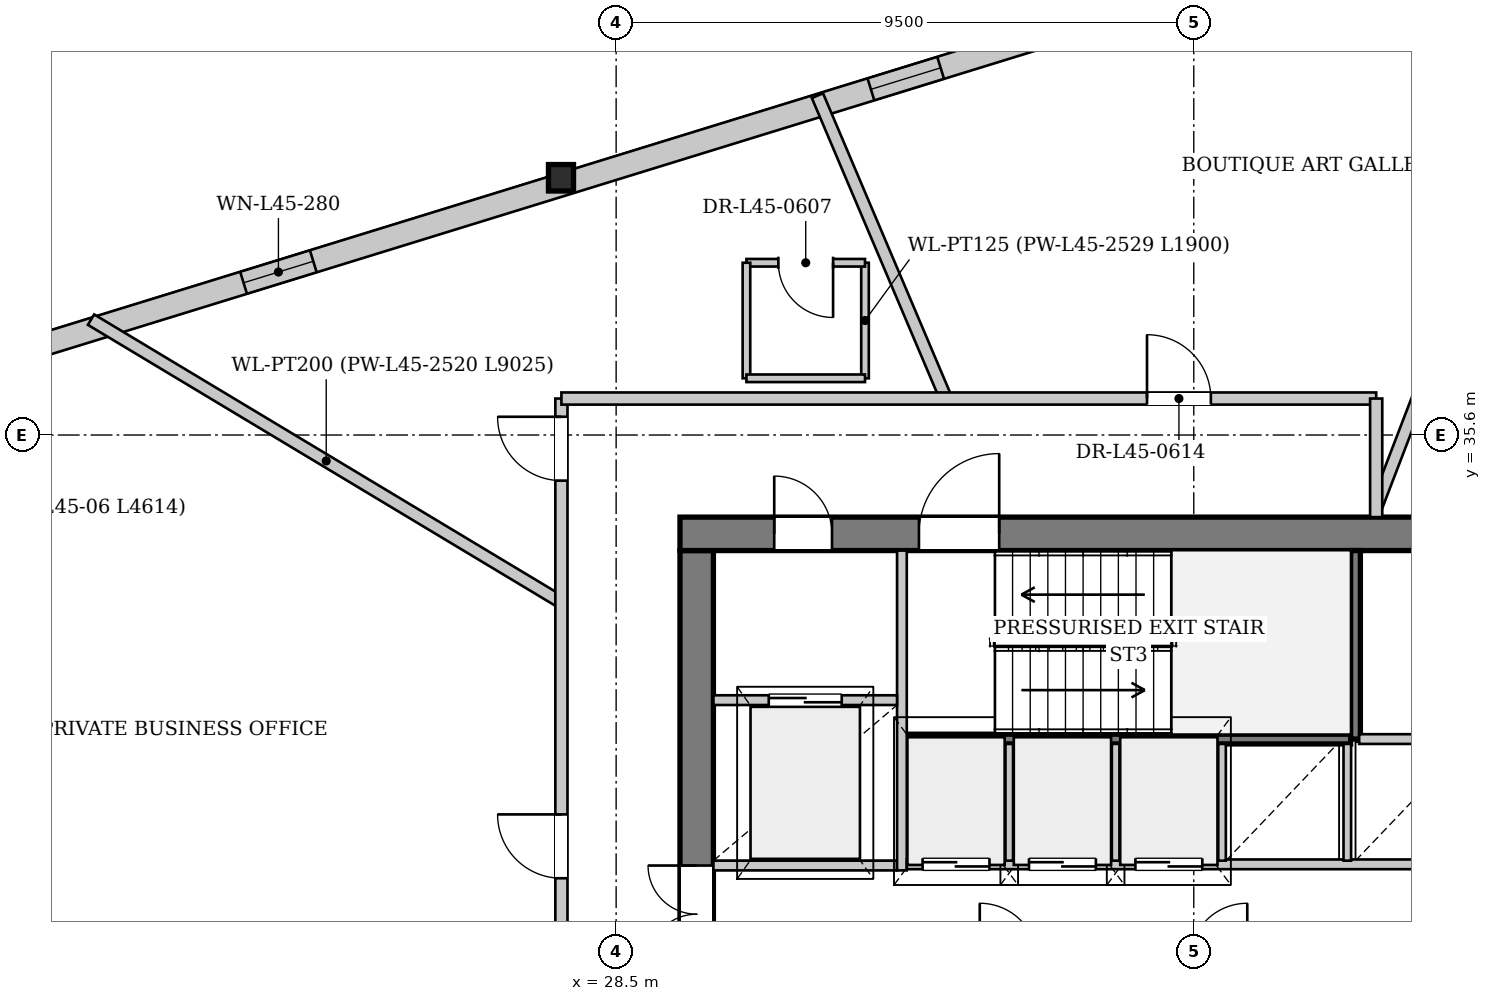
"""IFC4 building model, lengths in metres.
Left out: names, types, materials, properties, quantities, classifications, styles, units other than length and angle.
Written with IfcOpenShell. Run it as: python <this file> out.ifc"""

import sys

from ifc_helpers import new_model, si_unit, direction, frame, frame_2d, origin, origin_2d, place, context, subcontext, project, spatial, rectangle, i_section, extrude, source, transform, mapped, element, fill, save


model = new_model("IFC4")
c1 = context("Model", 3, precision=1e-05, world=origin(), true_north=direction((0.0, 1.0)))
c2 = subcontext(c1, "Body", "Model", "MODEL_VIEW")
j1 = project(units=[si_unit("LENGTHUNIT", "METRE"), si_unit("PLANEANGLEUNIT", "RADIAN")], contexts=[c1])
p1 = place(None, origin())
s1 = spatial("IfcSite", under=j1, at=p1, CompositionType="ELEMENT")
p2 = place(p1, origin())
s2 = spatial("IfcBuilding", under=s1, at=p2, CompositionType="ELEMENT")
p3 = place(p2, frame((0.0, 0.0, 171.45)))
s3 = spatial("IfcBuildingStorey", under=s2, at=p3, CompositionType="ELEMENT", Elevation=171.45)
m1 = source(origin(), c2, "Body", "SweptSolid", [
    extrude(i_section(OverallWidth=0.412, OverallDepth=0.435, WebThickness=0.031, FlangeThickness=0.05, at=origin_2d()), origin(), (0.0, 0.0, 1.0), 3.398),
])
p4 = place(p3, frame((27.69, 39.942, 0.0), z_axis=(-0.057121293982, -0.065599674724, 0.996209737179), x_axis=(0.754160771495, -0.65668982841, 0.0)))
e1 = element("IfcColumn", 1, at=p4, inside=s3, PredefinedType="COLUMN", context=c2, shape_type="MappedRepresentation", body=[
    mapped(m1, transform((0.0, 0.0, 0.0), x_axis=(1.0, 0.0, 0.0), y_axis=(0.0, 1.0, 0.0), z_axis=(0.0, 0.0, 1.0), scale=1.0)),
])
p5 = place(p3, frame((21.913, 15.928, 0.0), z_axis=(0.0, 0.0, 1.0), x_axis=(-0.384327280835, 0.92319691356, 0.0)))
e2 = element("IfcWall", 2, at=p5, inside=s3, PredefinedType="SOLIDWALL", context=c2, shape_type="SweptSolid", body=[
    extrude(rectangle(XDim=17.872, YDim=0.32, at=frame_2d((8.936, 0.0))), origin(), (0.0, 0.0, 1.0), 2.722),
])
p6 = place(p5, frame((4.969, 0.0, 0.0)))
e3 = element("IfcOpeningElement", 3, at=p6, cuts=e2, PredefinedType="OPENING", context=c2, shape_type="SweptSolid", body=[
    extrude(rectangle(XDim=1.5, YDim=2.3, at=frame_2d((0.75, 1.15))), frame((0.0, 0.17, 0.0), z_axis=(0.0, -1.0, 0.0), x_axis=(1.0, 0.0, 0.0)), (0.0, 0.0, 1.0), 0.34),
])
p7 = place(p5, frame((11.925, 0.0, 0.252)))
e4 = element("IfcOpeningElement", 4, at=p7, cuts=e2, PredefinedType="OPENING", context=c2, shape_type="SweptSolid", body=[
    extrude(rectangle(XDim=2.6, YDim=2.35, at=frame_2d((1.3, 1.175))), frame((0.0, 0.17, 0.0), z_axis=(0.0, -1.0, 0.0), x_axis=(1.0, 0.0, 0.0)), (0.0, 0.0, 1.0), 0.34),
])
p8 = place(p3, frame((16.837, 36.396, 0.0), z_axis=(0.0, 0.0, 1.0), x_axis=(0.955604756782, 0.294651571887, 0.0)))
e5 = element("IfcWall", 5, at=p8, inside=s3, PredefinedType="SOLIDWALL", context=c2, shape_type="SweptSolid", body=[
    extrude(rectangle(XDim=22.833, YDim=0.38, at=frame_2d((11.417, 0.0))), origin(), (0.0, 0.0, 1.0), 2.722),
])
p9 = place(p8, frame((5.793, 0.0, 0.65)))
e6 = element("IfcOpeningElement", 6, at=p9, cuts=e5, PredefinedType="OPENING", context=c2, shape_type="SweptSolid", body=[
    extrude(rectangle(XDim=1.2, YDim=1.5, at=frame_2d((0.6, 0.75))), frame((0.0, 0.2, 0.0), z_axis=(0.0, -1.0, 0.0), x_axis=(1.0, 0.0, 0.0)), (0.0, 0.0, 1.0), 0.4),
])
p10 = place(p8, frame((16.59, 0.0, 0.65)))
e7 = element("IfcOpeningElement", 7, at=p10, cuts=e5, PredefinedType="OPENING", context=c2, shape_type="SweptSolid", body=[
    extrude(rectangle(XDim=1.2, YDim=1.5, at=frame_2d((0.6, 0.75))), frame((0.0, 0.2, 0.0), z_axis=(0.0, -1.0, 0.0), x_axis=(1.0, 0.0, 0.0)), (0.0, 0.0, 1.0), 0.4),
])
p11 = place(p3, frame((29.825, 19.5, 0.0), z_axis=(0.0, 0.0, 1.0), x_axis=(0.0, 1.0, 0.0)))
e8 = element("IfcWall", 8, at=p11, inside=s3, PredefinedType="SHEAR", context=c2, shape_type="SweptSolid", body=[
    extrude(rectangle(XDim=14.2, YDim=0.55, at=frame_2d((7.1, 0.0))), origin(), (0.0, 0.0, 1.0), 3.33),
])
p12 = place(p11, frame((7.42, 0.0, 0.0)))
e9 = element("IfcOpeningElement", 9, at=p12, cuts=e8, PredefinedType="OPENING", context=c2, shape_type="SweptSolid", body=[
    extrude(rectangle(XDim=1.6, YDim=2.2, at=frame_2d((0.8, 1.1))), frame((0.0, 0.285, 0.0), z_axis=(0.0, -1.0, 0.0), x_axis=(1.0, 0.0, 0.0)), (0.0, 0.0, 1.0), 0.57),
])
p13 = place(p3, frame((29.55, 33.975, 0.0), z_axis=(0.0, 0.0, 1.0), x_axis=(1.0, 0.0, 0.0)))
e10 = element("IfcWall", 10, at=p13, inside=s3, PredefinedType="SHEAR", context=c2, shape_type="SweptSolid", body=[
    extrude(rectangle(XDim=16.9, YDim=0.55, at=frame_2d((8.45, 0.0))), origin(), (0.0, 0.0, 1.0), 3.33),
])
p14 = place(p13, frame((1.55, 0.0, 0.0)))
e11 = element("IfcOpeningElement", 11, at=p14, cuts=e10, PredefinedType="OPENING", context=c2, shape_type="SweptSolid", body=[
    extrude(rectangle(XDim=0.95, YDim=2.1, at=frame_2d((0.475, 1.05))), frame((0.0, 0.285, 0.0), z_axis=(0.0, -1.0, 0.0), x_axis=(1.0, 0.0, 0.0)), (0.0, 0.0, 1.0), 0.57),
])
p15 = place(p13, frame((3.93, 0.0, 0.0)))
e12 = element("IfcOpeningElement", 12, at=p15, cuts=e10, PredefinedType="OPENING", context=c2, shape_type="SweptSolid", body=[
    extrude(rectangle(XDim=1.32, YDim=2.2, at=frame_2d((0.66, 1.1))), frame((0.0, 0.285, 0.0), z_axis=(0.0, -1.0, 0.0), x_axis=(1.0, 0.0, 0.0)), (0.0, 0.0, 1.0), 0.57),
])
p16 = place(p3, frame((33.28, 30.6, 0.0), z_axis=(0.0, 0.0, 1.0), x_axis=(1.0, 0.0, 0.0)))
e13 = element("IfcWall", 13, at=p16, inside=s3, PredefinedType="PARTITIONING", context=c2, shape_type="SweptSolid", body=[
    extrude(rectangle(XDim=7.3, YDim=0.16, at=frame_2d((3.65, 0.0))), origin(), (0.0, 0.0, 1.0), 3.33),
])
p17 = place(p3, frame((40.66, 30.6, 0.0), z_axis=(0.0, 0.0, 1.0), x_axis=(0.0, 1.0, 0.0)))
e14 = element("IfcWall", 14, at=p17, inside=s3, PredefinedType="PARTITIONING", context=c2, shape_type="SweptSolid", body=[
    extrude(rectangle(XDim=3.1, YDim=0.16, at=frame_2d((1.55, 0.0))), origin(), (0.0, 0.0, 1.0), 3.33),
])
p18 = place(p3, frame((30.1, 28.52, 0.0), z_axis=(0.0, 0.0, 1.0), x_axis=(1.0, 0.0, 0.0)))
e15 = element("IfcWall", 15, at=p18, inside=s3, PredefinedType="PARTITIONING", context=c2, shape_type="SweptSolid", body=[
    extrude(rectangle(XDim=3.02, YDim=0.16, at=frame_2d((1.51, 0.0))), origin(), (0.0, 0.0, 1.0), 3.33),
])
p19 = place(p3, frame((33.2, 28.44, 0.0), z_axis=(0.0, 0.0, 1.0), x_axis=(0.0, 1.0, 0.0)))
e16 = element("IfcWall", 16, at=p19, inside=s3, PredefinedType="PARTITIONING", context=c2, shape_type="SweptSolid", body=[
    extrude(rectangle(XDim=5.26, YDim=0.16, at=frame_2d((2.63, 0.0))), origin(), (0.0, 0.0, 1.0), 3.33),
])
p20 = place(p3, frame((30.1, 31.24, 0.0), z_axis=(0.0, 0.0, 1.0), x_axis=(1.0, 0.0, 0.0)))
e17 = element("IfcWall", 17, at=p20, inside=s3, PredefinedType="PARTITIONING", context=c2, shape_type="SweptSolid", body=[
    extrude(rectangle(XDim=3.02, YDim=0.16, at=frame_2d((1.51, 0.0))), origin(), (0.0, 0.0, 1.0), 3.33),
])
p21 = place(p20, frame((0.91, 0.0, 0.0)))
e18 = element("IfcOpeningElement", 18, at=p21, cuts=e17, PredefinedType="OPENING", context=c2, shape_type="SweptSolid", body=[
    extrude(rectangle(XDim=1.2, YDim=2.2, at=frame_2d((0.6, 1.1))), frame((0.0, 0.09, 0.0), z_axis=(0.0, -1.0, 0.0), x_axis=(1.0, 0.0, 0.0)), (0.0, 0.0, 1.0), 0.18),
])
p22 = place(p3, frame((33.28, 28.54, 0.0), z_axis=(0.0, 0.0, 1.0), x_axis=(1.0, 0.0, 0.0)))
e19 = element("IfcWall", 19, at=p22, inside=s3, PredefinedType="PARTITIONING", context=c2, shape_type="SweptSolid", body=[
    extrude(rectangle(XDim=12.62, YDim=0.16, at=frame_2d((6.31, 0.0))), origin(), (0.0, 0.0, 1.0), 3.33),
])
p23 = place(p22, frame((0.26, 0.0, 0.0)))
e20 = element("IfcOpeningElement", 20, at=p23, cuts=e19, PredefinedType="OPENING", context=c2, shape_type="SweptSolid", body=[
    extrude(rectangle(XDim=1.1, YDim=2.2, at=frame_2d((0.55, 1.1))), frame((0.0, 0.09, 0.0), z_axis=(0.0, -1.0, 0.0), x_axis=(1.0, 0.0, 0.0)), (0.0, 0.0, 1.0), 0.18),
])
p24 = place(p22, frame((2.01, 0.0, 0.0)))
e21 = element("IfcOpeningElement", 21, at=p24, cuts=e19, PredefinedType="OPENING", context=c2, shape_type="SweptSolid", body=[
    extrude(rectangle(XDim=1.1, YDim=2.2, at=frame_2d((0.55, 1.1))), frame((0.0, 0.09, 0.0), z_axis=(0.0, -1.0, 0.0), x_axis=(1.0, 0.0, 0.0)), (0.0, 0.0, 1.0), 0.18),
])
p25 = place(p22, frame((3.76, 0.0, 0.0)))
e22 = element("IfcOpeningElement", 22, at=p25, cuts=e19, PredefinedType="OPENING", context=c2, shape_type="SweptSolid", body=[
    extrude(rectangle(XDim=1.1, YDim=2.2, at=frame_2d((0.55, 1.1))), frame((0.0, 0.09, 0.0), z_axis=(0.0, -1.0, 0.0), x_axis=(1.0, 0.0, 0.0)), (0.0, 0.0, 1.0), 0.18),
])
p26 = place(p3, frame((40.72, 30.6, 0.0), z_axis=(0.0, 0.0, 1.0), x_axis=(1.0, 0.0, 0.0)))
e23 = element("IfcWall", 23, at=p26, inside=s3, PredefinedType="PARTITIONING", context=c2, shape_type="SweptSolid", body=[
    extrude(rectangle(XDim=5.18, YDim=0.16, at=frame_2d((2.59, 0.0))), origin(), (0.0, 0.0, 1.0), 3.33),
])
for number, where, z_axis, x_axis in (
    (24, (34.965, 28.6, 0.0), (0.0, 0.0, 1.0), (0.0, 1.0, 0.0)),
    (25, (36.715, 28.6, 0.0), (0.0, 0.0, 1.0), (0.0, 1.0, 0.0)),
    (26, (38.465, 28.6, 0.0), (0.0, 0.0, 1.0), (0.0, 1.0, 0.0)),
    (27, (40.525, 28.6, 0.0), (0.0, 0.0, 1.0), (0.0, 1.0, 0.0)),
):
    element("IfcWall", number, at=place(p3, frame(where, z_axis=z_axis, x_axis=x_axis)), inside=s3, PredefinedType="PARTITIONING", context=c2, shape_type="SweptSolid", body=[
        extrude(rectangle(XDim=1.92, YDim=0.125, at=frame_2d((0.96, 0.0))), origin(), (0.0, 0.0, 1.0), 3.33),
    ])
p27 = place(p3, frame((27.6, 32.849, 0.0), z_axis=(0.0, 0.0, 1.0), x_axis=(-0.857180094002, 0.515016782684, 0.0)))
e28 = element("IfcWall", 28, at=p27, inside=s3, PredefinedType="PARTITIONING", context=c2, shape_type="SweptSolid", body=[
    extrude(rectangle(XDim=9.025, YDim=0.2, at=frame_2d((4.513, 0.0))), origin(), (0.0, 0.0, 1.0), 3.33),
])
p28 = place(p3, frame((41.0, 34.415, 0.0), z_axis=(0.0, 0.0, 1.0), x_axis=(0.358366692875, 0.933580908887, 0.0)))
e29 = element("IfcWall", 29, at=p28, inside=s3, PredefinedType="PARTITIONING", context=c2, shape_type="SweptSolid", body=[
    extrude(rectangle(XDim=9.752, YDim=0.2, at=frame_2d((4.876, 0.0))), origin(), (0.0, 0.0, 1.0), 3.33),
])
p29 = place(p3, frame((33.925, 36.2, 0.0), z_axis=(0.0, 0.0, 1.0), x_axis=(-0.390725959749, 0.920507047436, 0.0)))
e30 = element("IfcWall", 30, at=p29, inside=s3, PredefinedType="PARTITIONING", context=c2, shape_type="SweptSolid", body=[
    extrude(rectangle(XDim=5.411, YDim=0.2, at=frame_2d((2.706, 0.0))), origin(), (0.0, 0.0, 1.0), 3.33),
])
p30 = place(p3, frame((32.593, 36.533, 0.0), z_axis=(0.0, 0.0, 1.0), x_axis=(0.0, 1.0, 0.0)))
e31 = element("IfcWall", 31, at=p30, inside=s3, PredefinedType="PARTITIONING", context=c2, shape_type="SweptSolid", body=[
    extrude(rectangle(XDim=1.9, YDim=0.125, at=frame_2d((0.95, 0.0))), origin(), (0.0, 0.0, 1.0), 3.33),
])
p31 = place(p3, frame((32.593, 38.433, 0.0), z_axis=(0.0, 0.0, 1.0), x_axis=(-1.0, 0.0, 0.0)))
e32 = element("IfcWall", 32, at=p31, inside=s3, PredefinedType="PARTITIONING", context=c2, shape_type="SweptSolid", body=[
    extrude(rectangle(XDim=1.95, YDim=0.125, at=frame_2d((0.975, 0.0))), origin(), (0.0, 0.0, 1.0), 3.33),
])
p32 = place(p31, frame((0.525, 0.0, 0.0)))
e33 = element("IfcOpeningElement", 33, at=p32, cuts=e32, PredefinedType="OPENING", context=c2, shape_type="SweptSolid", body=[
    extrude(rectangle(XDim=0.9, YDim=2.1, at=frame_2d((0.45, 1.05))), frame((0.0, 0.073, 0.0), z_axis=(0.0, -1.0, 0.0), x_axis=(1.0, 0.0, 0.0)), (0.0, 0.0, 1.0), 0.145),
])
p33 = place(p3, frame((30.643, 38.433, 0.0), z_axis=(0.0, 0.0, 1.0), x_axis=(0.0, -1.0, 0.0)))
e34 = element("IfcWall", 34, at=p33, inside=s3, PredefinedType="PARTITIONING", context=c2, shape_type="SweptSolid", body=[
    extrude(rectangle(XDim=1.9, YDim=0.125, at=frame_2d((0.95, 0.0))), origin(), (0.0, 0.0, 1.0), 3.33),
])
p34 = place(p3, frame((30.643, 36.533, 0.0), z_axis=(0.0, 0.0, 1.0), x_axis=(1.0, 0.0, 0.0)))
e35 = element("IfcWall", 35, at=p34, inside=s3, PredefinedType="PARTITIONING", context=c2, shape_type="SweptSolid", body=[
    extrude(rectangle(XDim=1.95, YDim=0.125, at=frame_2d((0.975, 0.0))), origin(), (0.0, 0.0, 1.0), 3.33),
])
p35 = place(p3, frame((27.6, 17.0, 0.0), z_axis=(0.0, 0.0, 1.0), x_axis=(0.0, 1.0, 0.0)))
e36 = element("IfcWall", 36, at=p35, inside=s3, PredefinedType="PARTITIONING", context=c2, shape_type="SweptSolid", body=[
    extrude(rectangle(XDim=19.2, YDim=0.2, at=frame_2d((9.6, 0.0))), origin(), (0.0, 0.0, 1.0), 3.33),
])
p36 = place(p35, frame((11.311, 0.0, 0.0)))
e37 = element("IfcOpeningElement", 37, at=p36, cuts=e36, PredefinedType="OPENING", context=c2, shape_type="SweptSolid", body=[
    extrude(rectangle(XDim=1.05, YDim=2.2, at=frame_2d((0.525, 1.1))), frame((0.0, 0.11, 0.0), z_axis=(0.0, -1.0, 0.0), x_axis=(1.0, 0.0, 0.0)), (0.0, 0.0, 1.0), 0.22),
])
p37 = place(p35, frame((3.087, 0.0, 0.0)))
e38 = element("IfcOpeningElement", 38, at=p37, cuts=e36, PredefinedType="OPENING", context=c2, shape_type="SweptSolid", body=[
    extrude(rectangle(XDim=1.05, YDim=2.2, at=frame_2d((0.525, 1.1))), frame((0.0, 0.11, 0.0), z_axis=(0.0, -1.0, 0.0), x_axis=(1.0, 0.0, 0.0)), (0.0, 0.0, 1.0), 0.22),
])
p38 = place(p35, frame((17.85, 0.0, 0.0)))
e39 = element("IfcOpeningElement", 39, at=p38, cuts=e36, PredefinedType="OPENING", context=c2, shape_type="SweptSolid", body=[
    extrude(rectangle(XDim=1.05, YDim=2.2, at=frame_2d((0.525, 1.1))), frame((0.0, 0.11, 0.0), z_axis=(0.0, -1.0, 0.0), x_axis=(1.0, 0.0, 0.0)), (0.0, 0.0, 1.0), 0.22),
])
p39 = place(p3, frame((27.6, 36.2, 0.0), z_axis=(0.0, 0.0, 1.0), x_axis=(1.0, 0.0, 0.0)))
e40 = element("IfcWall", 40, at=p39, inside=s3, PredefinedType="PARTITIONING", context=c2, shape_type="SweptSolid", body=[
    extrude(rectangle(XDim=13.4, YDim=0.2, at=frame_2d((6.7, 0.0))), origin(), (0.0, 0.0, 1.0), 3.33),
])
p40 = place(p39, frame((9.631, 0.0, 0.0)))
e41 = element("IfcOpeningElement", 41, at=p40, cuts=e40, PredefinedType="OPENING", context=c2, shape_type="SweptSolid", body=[
    extrude(rectangle(XDim=1.05, YDim=2.2, at=frame_2d((0.525, 1.1))), frame((0.0, 0.11, 0.0), z_axis=(0.0, -1.0, 0.0), x_axis=(1.0, 0.0, 0.0)), (0.0, 0.0, 1.0), 0.22),
])
p41 = place(p3, frame((41.0, 34.25, 0.0), z_axis=(0.0, 0.0, 1.0), x_axis=(0.0, 1.0, 0.0)))
e42 = element("IfcWall", 42, at=p41, inside=s3, PredefinedType="PARTITIONING", context=c2, shape_type="SweptSolid", body=[
    extrude(rectangle(XDim=1.95, YDim=0.2, at=frame_2d((0.975, 0.0))), origin(), (0.0, 0.0, 1.0), 3.33),
])
m2 = source(origin(), c2, "Body", "SweptSolid", [
    extrude(rectangle(XDim=1.2, YDim=1.5, at=frame_2d((0.6, 0.75))), frame((0.0, 0.03, 0.0), z_axis=(0.0, -1.0, 0.0), x_axis=(1.0, 0.0, 0.0)), (0.0, 0.0, 1.0), 0.06),
])
p42 = place(p9, origin())
e43 = element("IfcWindow", 43, at=p42, inside=s3, PartitioningType="SINGLE_PANEL", PredefinedType="WINDOW", context=c2, shape_type="MappedRepresentation", body=[
    mapped(m2, transform((0.0, 0.0, 0.0), x_axis=(1.0, 0.0, 0.0), y_axis=(0.0, 1.0, 0.0), z_axis=(0.0, 0.0, 1.0), scale=1.0)),
])
fill(e6, e43)
p43 = place(p10, origin())
e44 = element("IfcWindow", 44, at=p43, inside=s3, PartitioningType="SINGLE_PANEL", PredefinedType="WINDOW", context=c2, shape_type="MappedRepresentation", body=[
    mapped(m2, transform((0.0, 0.0, 0.0), x_axis=(1.0, 0.0, 0.0), y_axis=(0.0, 1.0, 0.0), z_axis=(0.0, 0.0, 1.0), scale=1.0)),
])
fill(e7, e44)
m3 = source(origin(), c2, "Body", "SweptSolid", [
    extrude(rectangle(XDim=1.6, YDim=2.2, at=frame_2d((0.8, 1.1))), frame((0.0, 0.025, 0.0), z_axis=(0.0, -1.0, 0.0), x_axis=(1.0, 0.0, 0.0)), (0.0, 0.0, 1.0), 0.05),
])
p44 = place(p12, origin())
e45 = element("IfcDoor", 45, at=p44, inside=s3, OperationType="DOUBLE_DOOR_SINGLE_SWING", PredefinedType="DOOR", context=c2, shape_type="MappedRepresentation", body=[
    mapped(m3, transform((0.0, 0.0, 0.0), x_axis=(1.0, 0.0, 0.0), y_axis=(0.0, 1.0, 0.0), z_axis=(0.0, 0.0, 1.0), scale=1.0)),
])
fill(e9, e45)
m4 = source(origin(), c2, "Body", "SweptSolid", [
    extrude(rectangle(XDim=0.95, YDim=2.1, at=frame_2d((0.475, 1.05))), frame((0.0, 0.025, 0.0), z_axis=(0.0, -1.0, 0.0), x_axis=(1.0, 0.0, 0.0)), (0.0, 0.0, 1.0), 0.05),
])
p45 = place(p14, origin())
e46 = element("IfcDoor", 46, at=p45, inside=s3, OperationType="SINGLE_SWING_LEFT", PredefinedType="DOOR", context=c2, shape_type="MappedRepresentation", body=[
    mapped(m4, transform((0.0, 0.0, 0.0), x_axis=(1.0, 0.0, 0.0), y_axis=(0.0, 1.0, 0.0), z_axis=(0.0, 0.0, 1.0), scale=1.0)),
])
fill(e11, e46)
m5 = source(origin(), c2, "Body", "SweptSolid", [
    extrude(rectangle(XDim=1.32, YDim=2.2, at=frame_2d((0.66, 1.1))), frame((0.0, 0.025, 0.0), z_axis=(0.0, -1.0, 0.0), x_axis=(1.0, 0.0, 0.0)), (0.0, 0.0, 1.0), 0.05),
])
p46 = place(p15, origin())
e47 = element("IfcDoor", 47, at=p46, inside=s3, OperationType="SINGLE_SWING_RIGHT", PredefinedType="DOOR", context=c2, shape_type="MappedRepresentation", body=[
    mapped(m5, transform((0.0, 0.0, 0.0), x_axis=(1.0, 0.0, 0.0), y_axis=(0.0, 1.0, 0.0), z_axis=(0.0, 0.0, 1.0), scale=1.0)),
])
fill(e12, e47)
m6 = source(origin(), c2, "Body", "SweptSolid", [
    extrude(rectangle(XDim=1.2, YDim=2.2, at=frame_2d((0.6, 1.1))), frame((0.0, 0.025, 0.0), z_axis=(0.0, -1.0, 0.0), x_axis=(1.0, 0.0, 0.0)), (0.0, 0.0, 1.0), 0.05),
])
p47 = place(p21, origin())
e48 = element("IfcDoor", 48, at=p47, inside=s3, OperationType="DOUBLE_DOOR_SLIDING", PredefinedType="DOOR", context=c2, shape_type="MappedRepresentation", body=[
    mapped(m6, transform((0.0, 0.0, 0.0), x_axis=(1.0, 0.0, 0.0), y_axis=(0.0, 1.0, 0.0), z_axis=(0.0, 0.0, 1.0), scale=1.0)),
])
fill(e18, e48)
m7 = source(origin(), c2, "Body", "SweptSolid", [
    extrude(rectangle(XDim=1.1, YDim=2.2, at=frame_2d((0.55, 1.1))), frame((0.0, 0.025, 0.0), z_axis=(0.0, -1.0, 0.0), x_axis=(1.0, 0.0, 0.0)), (0.0, 0.0, 1.0), 0.05),
])
p48 = place(p23, origin())
e49 = element("IfcDoor", 49, at=p48, inside=s3, OperationType="DOUBLE_DOOR_SLIDING", PredefinedType="DOOR", context=c2, shape_type="MappedRepresentation", body=[
    mapped(m7, transform((0.0, 0.0, 0.0), x_axis=(1.0, 0.0, 0.0), y_axis=(0.0, 1.0, 0.0), z_axis=(0.0, 0.0, 1.0), scale=1.0)),
])
fill(e20, e49)
p49 = place(p24, origin())
e50 = element("IfcDoor", 50, at=p49, inside=s3, OperationType="DOUBLE_DOOR_SLIDING", PredefinedType="DOOR", context=c2, shape_type="MappedRepresentation", body=[
    mapped(m7, transform((0.0, 0.0, 0.0), x_axis=(1.0, 0.0, 0.0), y_axis=(0.0, 1.0, 0.0), z_axis=(0.0, 0.0, 1.0), scale=1.0)),
])
fill(e21, e50)
p50 = place(p25, origin())
e51 = element("IfcDoor", 51, at=p50, inside=s3, OperationType="DOUBLE_DOOR_SLIDING", PredefinedType="DOOR", context=c2, shape_type="MappedRepresentation", body=[
    mapped(m7, transform((0.0, 0.0, 0.0), x_axis=(1.0, 0.0, 0.0), y_axis=(0.0, 1.0, 0.0), z_axis=(0.0, 0.0, 1.0), scale=1.0)),
])
fill(e22, e51)
m8 = source(origin(), c2, "Body", "SweptSolid", [
    extrude(rectangle(XDim=0.9, YDim=2.1, at=frame_2d((0.45, 1.05))), frame((0.0, 0.025, 0.0), z_axis=(0.0, -1.0, 0.0), x_axis=(1.0, 0.0, 0.0)), (0.0, 0.0, 1.0), 0.05),
])
p51 = place(p32, origin())
e52 = element("IfcDoor", 52, at=p51, inside=s3, OperationType="SINGLE_SWING_LEFT", PredefinedType="DOOR", context=c2, shape_type="MappedRepresentation", body=[
    mapped(m8, transform((0.0, 0.0, 0.0), x_axis=(1.0, 0.0, 0.0), y_axis=(0.0, 1.0, 0.0), z_axis=(0.0, 0.0, 1.0), scale=1.0)),
])
fill(e33, e52)
m9 = source(origin(), c2, "Body", "SweptSolid", [
    extrude(rectangle(XDim=1.05, YDim=2.2, at=frame_2d((0.525, 1.1))), frame((0.0, 0.025, 0.0), z_axis=(0.0, -1.0, 0.0), x_axis=(1.0, 0.0, 0.0)), (0.0, 0.0, 1.0), 0.05),
])
p52 = place(p36, origin())
e53 = element("IfcDoor", 53, at=p52, inside=s3, OperationType="SINGLE_SWING_RIGHT", PredefinedType="DOOR", context=c2, shape_type="MappedRepresentation", body=[
    mapped(m9, transform((0.0, 0.0, 0.0), x_axis=(1.0, 0.0, 0.0), y_axis=(0.0, 1.0, 0.0), z_axis=(0.0, 0.0, 1.0), scale=1.0)),
])
fill(e37, e53)
p53 = place(p38, origin())
e54 = element("IfcDoor", 54, at=p53, inside=s3, OperationType="SINGLE_SWING_RIGHT", PredefinedType="DOOR", context=c2, shape_type="MappedRepresentation", body=[
    mapped(m9, transform((0.0, 0.0, 0.0), x_axis=(1.0, 0.0, 0.0), y_axis=(0.0, 1.0, 0.0), z_axis=(0.0, 0.0, 1.0), scale=1.0)),
])
fill(e39, e54)
p54 = place(p40, origin())
e55 = element("IfcDoor", 55, at=p54, inside=s3, OperationType="SINGLE_SWING_LEFT", PredefinedType="DOOR", context=c2, shape_type="MappedRepresentation", body=[
    mapped(m9, transform((0.0, 0.0, 0.0), x_axis=(1.0, 0.0, 0.0), y_axis=(0.0, 1.0, 0.0), z_axis=(0.0, 0.0, 1.0), scale=1.0)),
])
fill(e41, e55)
save(model, sys.argv[1])
